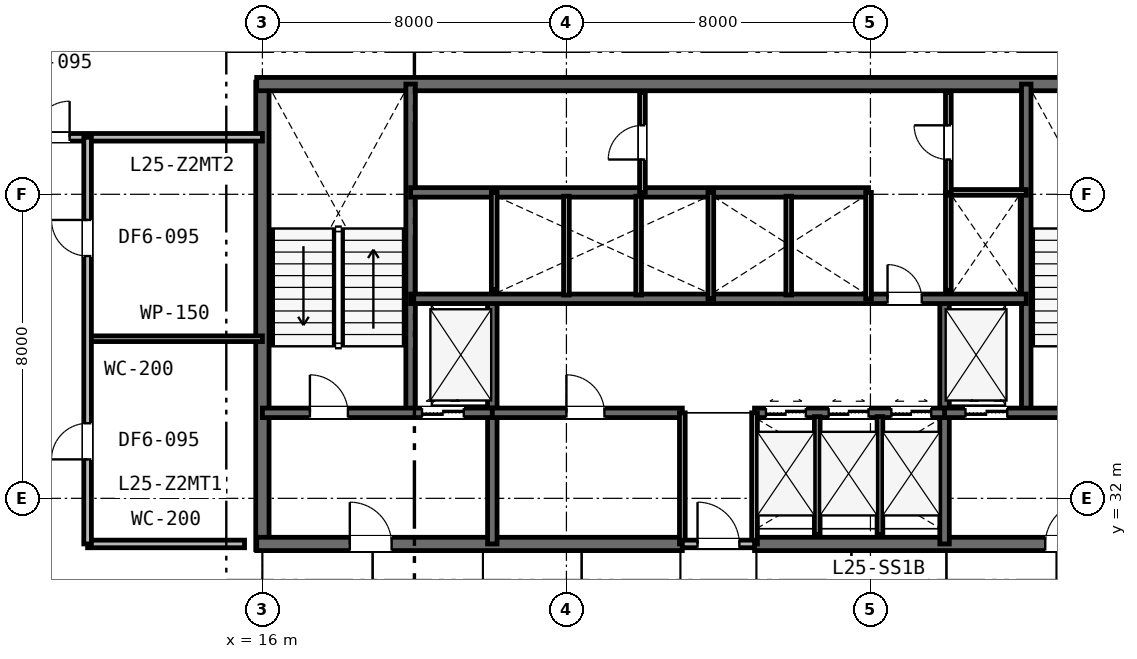
"""IFC4 building model, lengths in metres.
Left out: names, types, materials, properties, quantities, classifications, styles, units other than length and angle.
Written with IfcOpenShell. Run it as: python <this file> out.ifc"""

import sys

from ifc_helpers import new_model, si_unit, direction, frame, frame_2d, origin, place, context, subcontext, project, spatial, rectangle, extrude, element, fill, save


model = new_model("IFC4")
c1 = context("Model", 3, precision=1e-05, world=origin(), true_north=direction((0.0, 1.0)))
c2 = subcontext(c1, "Body", "Model", "MODEL_VIEW")
j1 = project(units=[si_unit("LENGTHUNIT", "METRE"), si_unit("PLANEANGLEUNIT", "RADIAN")], contexts=[c1])
p1 = place(None, origin())
s1 = spatial("IfcSite", under=j1, at=p1, CompositionType="ELEMENT")
p2 = place(p1, origin())
s2 = spatial("IfcBuilding", under=s1, at=p2, CompositionType="ELEMENT")
p3 = place(p2, frame((0.0, 0.0, 100.8)))
s3 = spatial("IfcBuildingStorey", under=s2, at=p3, CompositionType="ELEMENT", Elevation=100.8)
p4 = place(p3, frame((16.0, 30.65, 0.0), z_axis=(0.0, 0.0, 1.0), x_axis=(0.0, 1.0, 0.0)))
e1 = element("IfcWall", 1, at=p4, inside=s3, PredefinedType="SHEAR", context=c2, shape_type="SweptSolid", body=[
    extrude(rectangle(XDim=12.3, YDim=0.35, at=frame_2d((6.15, 0.0))), origin(), (0.0, 0.0, 1.0), 3.6),
])
p5 = place(p3, frame((15.85, 42.9, 0.0), z_axis=(0.0, 0.0, 1.0), x_axis=(1.0, 0.0, 0.0)))
e2 = element("IfcWall", 2, at=p5, inside=s3, PredefinedType="SHEAR", context=c2, shape_type="SweptSolid", body=[
    extrude(rectangle(XDim=24.3, YDim=0.35, at=frame_2d((12.15, 0.0))), origin(), (0.0, 0.0, 1.0), 3.6),
])
p6 = place(p3, frame((15.85, 30.8, 0.0), z_axis=(0.0, 0.0, 1.0), x_axis=(1.0, 0.0, 0.0)))
e3 = element("IfcWall", 3, at=p6, inside=s3, PredefinedType="SHEAR", context=c2, shape_type="SweptSolid", body=[
    extrude(rectangle(XDim=11.2, YDim=0.35, at=frame_2d((5.6, 0.0))), origin(), (0.0, 0.0, 1.0), 3.6),
])
p7 = place(p6, frame((2.45, 0.0, 0.0)))
e4 = element("IfcOpeningElement", 4, at=p7, cuts=e3, PredefinedType="OPENING", context=c2, shape_type="SweptSolid", body=[
    extrude(rectangle(XDim=1.1, YDim=2.15, at=frame_2d((0.55, 1.075))), frame((0.0, 0.185, 0.0), z_axis=(0.0, -1.0, 0.0), x_axis=(1.0, 0.0, 0.0)), (0.0, 0.0, 1.0), 0.37),
])
p8 = place(p3, frame((28.95, 30.8, 0.0), z_axis=(0.0, 0.0, 1.0), x_axis=(1.0, 0.0, 0.0)))
e5 = element("IfcWall", 5, at=p8, inside=s3, PredefinedType="SHEAR", context=c2, shape_type="SweptSolid", body=[
    extrude(rectangle(XDim=11.2, YDim=0.35, at=frame_2d((5.6, 0.0))), origin(), (0.0, 0.0, 1.0), 3.6),
])
p9 = place(p8, frame((7.65, 0.0, 0.0)))
e6 = element("IfcOpeningElement", 6, at=p9, cuts=e5, PredefinedType="OPENING", context=c2, shape_type="SweptSolid", body=[
    extrude(rectangle(XDim=1.1, YDim=2.15, at=frame_2d((0.55, 1.075))), frame((0.0, 0.185, 0.0), z_axis=(0.0, -1.0, 0.0), x_axis=(1.0, 0.0, 0.0)), (0.0, 0.0, 1.0), 0.37),
])
for number, where, z_axis, x_axis in (
    (7, (19.9, 34.25, 0.0), (0.0, 0.0, 1.0), (0.0, 1.0, 0.0)),
    (8, (36.1, 34.25, 0.0), (0.0, 0.0, 1.0), (0.0, 1.0, 0.0)),
):
    element("IfcWall", number, at=place(p3, frame(where, z_axis=z_axis, x_axis=x_axis)), inside=s3, PredefinedType="SHEAR", context=c2, shape_type="SweptSolid", body=[
        extrude(rectangle(XDim=8.65, YDim=0.25, at=frame_2d((4.325, 0.0))), origin(), (0.0, 0.0, 1.0), 3.6),
    ])
for number, where, z_axis, x_axis in (
    (9, (22.05, 30.8, 0.0), (0.0, 0.0, 1.0), (0.0, 1.0, 0.0)),
    (10, (33.95, 30.8, 0.0), (0.0, 0.0, 1.0), (0.0, 1.0, 0.0)),
):
    element("IfcWall", number, at=place(p3, frame(where, z_axis=z_axis, x_axis=x_axis)), inside=s3, PredefinedType="SHEAR", context=c2, shape_type="SweptSolid", body=[
        extrude(rectangle(XDim=6.45, YDim=0.25, at=frame_2d((3.225, 0.0))), origin(), (0.0, 0.0, 1.0), 3.6),
    ])
p10 = place(p3, frame((16.0, 34.25, 0.0), z_axis=(0.0, 0.0, 1.0), x_axis=(1.0, 0.0, 0.0)))
e11 = element("IfcWall", 11, at=p10, inside=s3, PredefinedType="SHEAR", context=c2, shape_type="SweptSolid", body=[
    extrude(rectangle(XDim=6.05, YDim=0.25, at=frame_2d((3.025, 0.0))), origin(), (0.0, 0.0, 1.0), 3.6),
])
p11 = place(p10, frame((1.25, 0.0, 0.0)))
e12 = element("IfcOpeningElement", 12, at=p11, cuts=e11, PredefinedType="OPENING", context=c2, shape_type="SweptSolid", body=[
    extrude(rectangle(XDim=1.0, YDim=2.15, at=frame_2d((0.5, 1.075))), frame((0.0, 0.135, 0.0), z_axis=(0.0, -1.0, 0.0), x_axis=(1.0, 0.0, 0.0)), (0.0, 0.0, 1.0), 0.27),
])
p12 = place(p10, frame((4.2, 0.0, 0.0)))
e13 = element("IfcOpeningElement", 13, at=p12, cuts=e11, PredefinedType="OPENING", context=c2, shape_type="SweptSolid", body=[
    extrude(rectangle(XDim=1.1, YDim=2.15, at=frame_2d((0.55, 1.075))), frame((0.0, 0.135, 0.0), z_axis=(0.0, -1.0, 0.0), x_axis=(1.0, 0.0, 0.0)), (0.0, 0.0, 1.0), 0.27),
])
p13 = place(p3, frame((33.95, 34.25, 0.0), z_axis=(0.0, 0.0, 1.0), x_axis=(1.0, 0.0, 0.0)))
e14 = element("IfcWall", 14, at=p13, inside=s3, PredefinedType="SHEAR", context=c2, shape_type="SweptSolid", body=[
    extrude(rectangle(XDim=6.05, YDim=0.25, at=frame_2d((3.025, 0.0))), origin(), (0.0, 0.0, 1.0), 3.6),
])
p14 = place(p13, frame((3.7, 0.0, 0.0)))
e15 = element("IfcOpeningElement", 15, at=p14, cuts=e14, PredefinedType="OPENING", context=c2, shape_type="SweptSolid", body=[
    extrude(rectangle(XDim=1.0, YDim=2.15, at=frame_2d((0.5, 1.075))), frame((0.0, 0.135, 0.0), z_axis=(0.0, -1.0, 0.0), x_axis=(1.0, 0.0, 0.0)), (0.0, 0.0, 1.0), 0.27),
])
p15 = place(p13, frame((0.55, 0.0, 0.0)))
e16 = element("IfcOpeningElement", 16, at=p15, cuts=e14, PredefinedType="OPENING", context=c2, shape_type="SweptSolid", body=[
    extrude(rectangle(XDim=1.1, YDim=2.15, at=frame_2d((0.55, 1.075))), frame((0.0, 0.135, 0.0), z_axis=(0.0, -1.0, 0.0), x_axis=(1.0, 0.0, 0.0)), (0.0, 0.0, 1.0), 0.27),
])
p16 = place(p3, frame((22.05, 34.25, 0.0), z_axis=(0.0, 0.0, 1.0), x_axis=(1.0, 0.0, 0.0)))
e17 = element("IfcWall", 17, at=p16, inside=s3, PredefinedType="SHEAR", context=c2, shape_type="SweptSolid", body=[
    extrude(rectangle(XDim=5.0, YDim=0.25, at=frame_2d((2.5, 0.0))), origin(), (0.0, 0.0, 1.0), 3.6),
])
p17 = place(p16, frame((1.95, 0.0, 0.0)))
e18 = element("IfcOpeningElement", 18, at=p17, cuts=e17, PredefinedType="OPENING", context=c2, shape_type="SweptSolid", body=[
    extrude(rectangle(XDim=1.0, YDim=2.15, at=frame_2d((0.5, 1.075))), frame((0.0, 0.135, 0.0), z_axis=(0.0, -1.0, 0.0), x_axis=(1.0, 0.0, 0.0)), (0.0, 0.0, 1.0), 0.27),
])
p18 = place(p3, frame((28.95, 34.25, 0.0), z_axis=(0.0, 0.0, 1.0), x_axis=(1.0, 0.0, 0.0)))
e19 = element("IfcWall", 19, at=p18, inside=s3, PredefinedType="SHEAR", context=c2, shape_type="SweptSolid", body=[
    extrude(rectangle(XDim=5.0, YDim=0.25, at=frame_2d((2.5, 0.0))), origin(), (0.0, 0.0, 1.0), 3.6),
])
p19 = place(p18, frame((0.3, 0.0, 0.0)))
e20 = element("IfcOpeningElement", 20, at=p19, cuts=e19, PredefinedType="OPENING", context=c2, shape_type="SweptSolid", body=[
    extrude(rectangle(XDim=1.05, YDim=2.15, at=frame_2d((0.525, 1.075))), frame((0.0, 0.135, 0.0), z_axis=(0.0, -1.0, 0.0), x_axis=(1.0, 0.0, 0.0)), (0.0, 0.0, 1.0), 0.27),
])
p20 = place(p18, frame((1.95, 0.0, 0.0)))
e21 = element("IfcOpeningElement", 21, at=p20, cuts=e19, PredefinedType="OPENING", context=c2, shape_type="SweptSolid", body=[
    extrude(rectangle(XDim=1.05, YDim=2.15, at=frame_2d((0.525, 1.075))), frame((0.0, 0.135, 0.0), z_axis=(0.0, -1.0, 0.0), x_axis=(1.0, 0.0, 0.0)), (0.0, 0.0, 1.0), 0.27),
])
p21 = place(p18, frame((3.6, 0.0, 0.0)))
e22 = element("IfcOpeningElement", 22, at=p21, cuts=e19, PredefinedType="OPENING", context=c2, shape_type="SweptSolid", body=[
    extrude(rectangle(XDim=1.05, YDim=2.15, at=frame_2d((0.525, 1.075))), frame((0.0, 0.135, 0.0), z_axis=(0.0, -1.0, 0.0), x_axis=(1.0, 0.0, 0.0)), (0.0, 0.0, 1.0), 0.27),
])
p22 = place(p3, frame((19.9, 37.25, 0.0), z_axis=(0.0, 0.0, 1.0), x_axis=(1.0, 0.0, 0.0)))
e23 = element("IfcWall", 23, at=p22, inside=s3, PredefinedType="SHEAR", context=c2, shape_type="SweptSolid", body=[
    extrude(rectangle(XDim=16.2, YDim=0.25, at=frame_2d((8.1, 0.0))), origin(), (0.0, 0.0, 1.0), 3.6),
])
p23 = place(p22, frame((12.55, 0.0, 0.0)))
e24 = element("IfcOpeningElement", 24, at=p23, cuts=e23, PredefinedType="OPENING", context=c2, shape_type="SweptSolid", body=[
    extrude(rectangle(XDim=0.9, YDim=2.15, at=frame_2d((0.45, 1.075))), frame((0.0, 0.135, 0.0), z_axis=(0.0, -1.0, 0.0), x_axis=(1.0, 0.0, 0.0)), (0.0, 0.0, 1.0), 0.27),
])
p24 = place(p3, frame((19.9, 40.05, 0.0), z_axis=(0.0, 0.0, 1.0), x_axis=(1.0, 0.0, 0.0)))
e25 = element("IfcWall", 25, at=p24, inside=s3, PredefinedType="SHEAR", context=c2, shape_type="SweptSolid", body=[
    extrude(rectangle(XDim=12.05, YDim=0.25, at=frame_2d((6.025, 0.0))), origin(), (0.0, 0.0, 1.0), 3.6),
])
p25 = place(p3, frame((27.05, 30.8, 0.0), z_axis=(0.0, 0.0, 1.0), x_axis=(0.0, 1.0, 0.0)))
e26 = element("IfcWall", 26, at=p25, inside=s3, PredefinedType="PLUMBINGWALL", context=c2, shape_type="SweptSolid", body=[
    extrude(rectangle(XDim=3.45, YDim=0.15, at=frame_2d((1.725, 0.0))), origin(), (0.0, 0.0, 1.0), 3.01),
])
p26 = place(p3, frame((28.95, 30.8, 0.0), z_axis=(0.0, 0.0, 1.0), x_axis=(0.0, 1.0, 0.0)))
e27 = element("IfcWall", 27, at=p26, inside=s3, PredefinedType="PLUMBINGWALL", context=c2, shape_type="SweptSolid", body=[
    extrude(rectangle(XDim=3.45, YDim=0.15, at=frame_2d((1.725, 0.0))), origin(), (0.0, 0.0, 1.0), 3.33),
])
p27 = place(p3, frame((27.05, 30.8, 0.0), z_axis=(0.0, 0.0, 1.0), x_axis=(1.0, 0.0, 0.0)))
e28 = element("IfcWall", 28, at=p27, inside=s3, PredefinedType="PARTITIONING", context=c2, shape_type="SweptSolid", body=[
    extrude(rectangle(XDim=1.9, YDim=0.2, at=frame_2d((0.95, 0.0))), origin(), (0.0, 0.0, 1.0), 3.01),
])
p28 = place(p27, frame((0.4, 0.0, 0.0)))
e29 = element("IfcOpeningElement", 29, at=p28, cuts=e28, PredefinedType="OPENING", context=c2, shape_type="SweptSolid", body=[
    extrude(rectangle(XDim=1.1, YDim=2.15, at=frame_2d((0.55, 1.075))), frame((0.0, 0.11, 0.0), z_axis=(0.0, -1.0, 0.0), x_axis=(1.0, 0.0, 0.0)), (0.0, 0.0, 1.0), 0.22),
])
for number, where, z_axis, x_axis in (
    (30, (30.6, 31.05, 0.0), (0.0, 0.0, 1.0), (0.0, 1.0, 0.0)),
    (31, (32.25, 31.05, 0.0), (0.0, 0.0, 1.0), (0.0, 1.0, 0.0)),
):
    element("IfcWall", number, at=place(p3, frame(where, z_axis=z_axis, x_axis=x_axis)), inside=s3, PredefinedType="PLUMBINGWALL", context=c2, shape_type="SweptSolid", body=[
        extrude(rectangle(XDim=3.1, YDim=0.15, at=frame_2d((1.55, 0.0))), origin(), (0.0, 0.0, 1.0), 3.33),
    ])
p29 = place(p3, frame((22.1, 37.49, 0.0), z_axis=(0.0, 0.0, 1.0), x_axis=(0.0, 1.0, 0.0)))
e32 = element("IfcWall", 32, at=p29, inside=s3, PredefinedType="PLUMBINGWALL", context=c2, shape_type="SweptSolid", body=[
    extrude(rectangle(XDim=2.56, YDim=0.15, at=frame_2d((1.28, 0.0))), origin(), (0.0, 0.0, 1.0), 3.33),
])
p30 = place(p3, frame((27.8, 37.25, 0.0), z_axis=(0.0, 0.0, 1.0), x_axis=(0.0, 1.0, 0.0)))
e33 = element("IfcWall", 33, at=p30, inside=s3, PredefinedType="PLUMBINGWALL", context=c2, shape_type="SweptSolid", body=[
    extrude(rectangle(XDim=2.8, YDim=0.15, at=frame_2d((1.4, 0.0))), origin(), (0.0, 0.0, 1.0), 3.33),
])
for number, where, z_axis, x_axis in (
    (34, (24.0, 37.35, 0.0), (0.0, 0.0, 1.0), (0.0, 1.0, 0.0)),
    (35, (25.9, 37.35, 0.0), (0.0, 0.0, 1.0), (0.0, 1.0, 0.0)),
):
    element("IfcWall", number, at=place(p3, frame(where, z_axis=z_axis, x_axis=x_axis)), inside=s3, PredefinedType="PLUMBINGWALL", context=c2, shape_type="SweptSolid", body=[
        extrude(rectangle(XDim=2.6, YDim=0.15, at=frame_2d((1.3, 0.0))), origin(), (0.0, 0.0, 1.0), 3.33),
    ])
p31 = place(p3, frame((31.95, 37.25, 0.0), z_axis=(0.0, 0.0, 1.0), x_axis=(0.0, 1.0, 0.0)))
e36 = element("IfcWall", 36, at=p31, inside=s3, PredefinedType="PLUMBINGWALL", context=c2, shape_type="SweptSolid", body=[
    extrude(rectangle(XDim=2.8, YDim=0.15, at=frame_2d((1.4, 0.0))), origin(), (0.0, 0.0, 1.0), 3.33),
])
p32 = place(p3, frame((29.85, 37.35, 0.0), z_axis=(0.0, 0.0, 1.0), x_axis=(0.0, 1.0, 0.0)))
e37 = element("IfcWall", 37, at=p32, inside=s3, PredefinedType="PLUMBINGWALL", context=c2, shape_type="SweptSolid", body=[
    extrude(rectangle(XDim=2.6, YDim=0.15, at=frame_2d((1.3, 0.0))), origin(), (0.0, 0.0, 1.0), 3.33),
])
p33 = place(p3, frame((34.05, 37.473, 0.0), z_axis=(0.0, 0.0, 1.0), x_axis=(0.0, 1.0, 0.0)))
e38 = element("IfcWall", 38, at=p33, inside=s3, PredefinedType="PLUMBINGWALL", context=c2, shape_type="SweptSolid", body=[
    extrude(rectangle(XDim=2.577, YDim=0.15, at=frame_2d((1.288, 0.0))), origin(), (0.0, 0.0, 1.0), 3.33),
])
p34 = place(p3, frame((34.05, 40.05, 0.0), z_axis=(0.0, 0.0, 1.0), x_axis=(1.0, 0.0, 0.0)))
e39 = element("IfcWall", 39, at=p34, inside=s3, PredefinedType="PARTITIONING", context=c2, shape_type="SweptSolid", body=[
    extrude(rectangle(XDim=2.05, YDim=0.15, at=frame_2d((1.025, 0.0))), origin(), (0.0, 0.0, 1.0), 3.33),
])
p35 = place(p3, frame((34.05, 40.05, 0.0), z_axis=(0.0, 0.0, 1.0), x_axis=(0.0, 1.0, 0.0)))
e40 = element("IfcWall", 40, at=p35, inside=s3, PredefinedType="PARTITIONING", context=c2, shape_type="SweptSolid", body=[
    extrude(rectangle(XDim=2.63, YDim=0.15, at=frame_2d((1.315, 0.0))), origin(), (0.0, 0.0, 1.0), 3.33),
])
p36 = place(p35, frame((0.865, 0.0, 0.0)))
e41 = element("IfcOpeningElement", 41, at=p36, cuts=e40, PredefinedType="OPENING", context=c2, shape_type="SweptSolid", body=[
    extrude(rectangle(XDim=0.9, YDim=2.15, at=frame_2d((0.45, 1.075))), frame((0.0, 0.085, 0.0), z_axis=(0.0, -1.0, 0.0), x_axis=(1.0, 0.0, 0.0)), (0.0, 0.0, 1.0), 0.17),
])
p37 = place(p3, frame((26.0, 40.05, 0.0), z_axis=(0.0, 0.0, 1.0), x_axis=(0.0, 1.0, 0.0)))
e42 = element("IfcWall", 42, at=p37, inside=s3, PredefinedType="PARTITIONING", context=c2, shape_type="SweptSolid", body=[
    extrude(rectangle(XDim=2.63, YDim=0.15, at=frame_2d((1.315, 0.0))), origin(), (0.0, 0.0, 1.0), 3.33),
])
p38 = place(p37, frame((0.865, 0.0, 0.0)))
e43 = element("IfcOpeningElement", 43, at=p38, cuts=e42, PredefinedType="OPENING", context=c2, shape_type="SweptSolid", body=[
    extrude(rectangle(XDim=0.9, YDim=2.15, at=frame_2d((0.45, 1.075))), frame((0.0, 0.085, 0.0), z_axis=(0.0, -1.0, 0.0), x_axis=(1.0, 0.0, 0.0)), (0.0, 0.0, 1.0), 0.17),
])
p39 = place(p3, frame((11.4, 30.8, 0.0), z_axis=(0.0, 0.0, 1.0), x_axis=(1.0, 0.0, 0.0)))
e44 = element("IfcWall", 44, at=p39, inside=s3, PredefinedType="PARTITIONING", context=c2, shape_type="SweptSolid", body=[
    extrude(rectangle(XDim=4.13, YDim=0.2, at=frame_2d((2.065, 0.0))), origin(), (0.0, 0.0, 1.0), 2.87),
])
p40 = place(p3, frame((0.1, 41.5, 0.0), z_axis=(0.0, 0.0, 1.0), x_axis=(1.0, 0.0, 0.0)))
e45 = element("IfcWall", 45, at=p40, inside=s3, PredefinedType="PARTITIONING", context=c2, shape_type="SweptSolid", body=[
    extrude(rectangle(XDim=15.9, YDim=0.2, at=frame_2d((7.95, 0.0))), origin(), (0.0, 0.0, 1.0), 2.87),
])
p41 = place(p40, frame((9.877, 0.0, 0.0)))
e46 = element("IfcOpeningElement", 46, at=p41, cuts=e45, PredefinedType="OPENING", context=c2, shape_type="SweptSolid", body=[
    extrude(rectangle(XDim=0.95, YDim=2.15, at=frame_2d((0.475, 1.075))), frame((0.0, 0.11, 0.0), z_axis=(0.0, -1.0, 0.0), x_axis=(1.0, 0.0, 0.0)), (0.0, 0.0, 1.0), 0.22),
])
p42 = place(p3, frame((11.4, 36.2, 0.0), z_axis=(0.0, 0.0, 1.0), x_axis=(1.0, 0.0, 0.0)))
e47 = element("IfcWall", 47, at=p42, inside=s3, PredefinedType="PARTITIONING", context=c2, shape_type="SweptSolid", body=[
    extrude(rectangle(XDim=4.6, YDim=0.15, at=frame_2d((2.3, 0.0))), origin(), (0.0, 0.0, 1.0), 3.33),
])
p43 = place(p3, frame((11.4, 30.8, 0.0), z_axis=(0.0, 0.0, 1.0), x_axis=(0.0, 1.0, 0.0)))
e48 = element("IfcWall", 48, at=p43, inside=s3, PredefinedType="PARTITIONING", context=c2, shape_type="SweptSolid", body=[
    extrude(rectangle(XDim=10.7, YDim=0.2, at=frame_2d((5.35, 0.0))), origin(), (0.0, 0.0, 1.0), 2.87),
])
p44 = place(p43, frame((2.225, 0.0, 0.0)))
e49 = element("IfcOpeningElement", 49, at=p44, cuts=e48, PredefinedType="OPENING", context=c2, shape_type="SweptSolid", body=[
    extrude(rectangle(XDim=0.95, YDim=2.15, at=frame_2d((0.475, 1.075))), frame((0.0, 0.11, 0.0), z_axis=(0.0, -1.0, 0.0), x_axis=(1.0, 0.0, 0.0)), (0.0, 0.0, 1.0), 0.22),
])
p45 = place(p43, frame((7.575, 0.0, 0.0)))
e50 = element("IfcOpeningElement", 50, at=p45, cuts=e48, PredefinedType="OPENING", context=c2, shape_type="SweptSolid", body=[
    extrude(rectangle(XDim=0.95, YDim=2.15, at=frame_2d((0.475, 1.075))), frame((0.0, 0.11, 0.0), z_axis=(0.0, -1.0, 0.0), x_axis=(1.0, 0.0, 0.0)), (0.0, 0.0, 1.0), 0.22),
])
p46 = place(p28, origin())
e51 = element("IfcDoor", 51, at=p46, inside=s3, OperationType="SINGLE_SWING_LEFT", PredefinedType="DOOR", context=c2, shape_type="SweptSolid", body=[
    extrude(rectangle(XDim=1.1, YDim=2.15, at=frame_2d((0.55, 1.075))), frame((0.0, 0.025, 0.0), z_axis=(0.0, -1.0, 0.0), x_axis=(1.0, 0.0, 0.0)), (0.0, 0.0, 1.0), 0.05),
])
fill(e29, e51)
p47 = place(p11, origin())
e52 = element("IfcDoor", 52, at=p47, inside=s3, OperationType="SINGLE_SWING_LEFT", PredefinedType="DOOR", context=c2, shape_type="SweptSolid", body=[
    extrude(rectangle(XDim=1.0, YDim=2.15, at=frame_2d((0.5, 1.075))), frame((0.0, 0.025, 0.0), z_axis=(0.0, -1.0, 0.0), x_axis=(1.0, 0.0, 0.0)), (0.0, 0.0, 1.0), 0.05),
])
fill(e12, e52)
p48 = place(p7, origin())
e53 = element("IfcDoor", 53, at=p48, inside=s3, OperationType="SINGLE_SWING_LEFT", PredefinedType="DOOR", context=c2, shape_type="SweptSolid", body=[
    extrude(rectangle(XDim=1.1, YDim=2.15, at=frame_2d((0.55, 1.075))), frame((0.0, 0.025, 0.0), z_axis=(0.0, -1.0, 0.0), x_axis=(1.0, 0.0, 0.0)), (0.0, 0.0, 1.0), 0.05),
])
fill(e4, e53)
p49 = place(p9, origin())
e54 = element("IfcDoor", 54, at=p49, inside=s3, OperationType="SINGLE_SWING_RIGHT", PredefinedType="DOOR", context=c2, shape_type="SweptSolid", body=[
    extrude(rectangle(XDim=1.1, YDim=2.15, at=frame_2d((0.55, 1.075))), frame((0.0, 0.025, 0.0), z_axis=(0.0, -1.0, 0.0), x_axis=(1.0, 0.0, 0.0)), (0.0, 0.0, 1.0), 0.05),
])
fill(e6, e54)
p50 = place(p17, origin())
e55 = element("IfcDoor", 55, at=p50, inside=s3, OperationType="SINGLE_SWING_LEFT", PredefinedType="DOOR", context=c2, shape_type="SweptSolid", body=[
    extrude(rectangle(XDim=1.0, YDim=2.15, at=frame_2d((0.5, 1.075))), frame((0.0, 0.025, 0.0), z_axis=(0.0, -1.0, 0.0), x_axis=(1.0, 0.0, 0.0)), (0.0, 0.0, 1.0), 0.05),
])
fill(e18, e55)
p51 = place(p23, origin())
e56 = element("IfcDoor", 56, at=p51, inside=s3, OperationType="SINGLE_SWING_LEFT", PredefinedType="DOOR", context=c2, shape_type="SweptSolid", body=[
    extrude(rectangle(XDim=0.9, YDim=2.15, at=frame_2d((0.45, 1.075))), frame((0.0, 0.025, 0.0), z_axis=(0.0, -1.0, 0.0), x_axis=(1.0, 0.0, 0.0)), (0.0, 0.0, 1.0), 0.05),
])
fill(e24, e56)
p52 = place(p36, origin())
e57 = element("IfcDoor", 57, at=p52, inside=s3, OperationType="SINGLE_SWING_RIGHT", PredefinedType="DOOR", context=c2, shape_type="SweptSolid", body=[
    extrude(rectangle(XDim=0.9, YDim=2.15, at=frame_2d((0.45, 1.075))), frame((0.0, 0.025, 0.0), z_axis=(0.0, -1.0, 0.0), x_axis=(1.0, 0.0, 0.0)), (0.0, 0.0, 1.0), 0.05),
])
fill(e41, e57)
p53 = place(p38, origin())
e58 = element("IfcDoor", 58, at=p53, inside=s3, OperationType="SINGLE_SWING_LEFT", PredefinedType="DOOR", context=c2, shape_type="SweptSolid", body=[
    extrude(rectangle(XDim=0.9, YDim=2.15, at=frame_2d((0.45, 1.075))), frame((0.0, 0.025, 0.0), z_axis=(0.0, -1.0, 0.0), x_axis=(1.0, 0.0, 0.0)), (0.0, 0.0, 1.0), 0.05),
])
fill(e43, e58)
p54 = place(p41, origin())
e59 = element("IfcDoor", 59, at=p54, inside=s3, OperationType="SINGLE_SWING_RIGHT", PredefinedType="DOOR", context=c2, shape_type="SweptSolid", body=[
    extrude(rectangle(XDim=0.95, YDim=2.15, at=frame_2d((0.475, 1.075))), frame((0.0, 0.025, 0.0), z_axis=(0.0, -1.0, 0.0), x_axis=(1.0, 0.0, 0.0)), (0.0, 0.0, 1.0), 0.05),
])
fill(e46, e59)
p55 = place(p44, origin())
e60 = element("IfcDoor", 60, at=p55, inside=s3, OperationType="SINGLE_SWING_LEFT", PredefinedType="DOOR", context=c2, shape_type="SweptSolid", body=[
    extrude(rectangle(XDim=0.95, YDim=2.15, at=frame_2d((0.475, 1.075))), frame((0.0, 0.025, 0.0), z_axis=(0.0, -1.0, 0.0), x_axis=(1.0, 0.0, 0.0)), (0.0, 0.0, 1.0), 0.05),
])
fill(e49, e60)
p56 = place(p45, origin())
e61 = element("IfcDoor", 61, at=p56, inside=s3, OperationType="SINGLE_SWING_RIGHT", PredefinedType="DOOR", context=c2, shape_type="SweptSolid", body=[
    extrude(rectangle(XDim=0.95, YDim=2.15, at=frame_2d((0.475, 1.075))), frame((0.0, 0.025, 0.0), z_axis=(0.0, -1.0, 0.0), x_axis=(1.0, 0.0, 0.0)), (0.0, 0.0, 1.0), 0.05),
])
fill(e50, e61)
p57 = place(p12, origin())
e62 = element("IfcDoor", 62, at=p57, inside=s3, OperationType="DOUBLE_DOOR_SLIDING", PredefinedType="DOOR", context=c2, shape_type="SweptSolid", body=[
    extrude(rectangle(XDim=1.1, YDim=2.15, at=frame_2d((0.55, 1.075))), frame((0.0, 0.025, 0.0), z_axis=(0.0, -1.0, 0.0), x_axis=(1.0, 0.0, 0.0)), (0.0, 0.0, 1.0), 0.05),
])
fill(e13, e62)
p58 = place(p15, origin())
e63 = element("IfcDoor", 63, at=p58, inside=s3, OperationType="DOUBLE_DOOR_SLIDING", PredefinedType="DOOR", context=c2, shape_type="SweptSolid", body=[
    extrude(rectangle(XDim=1.1, YDim=2.15, at=frame_2d((0.55, 1.075))), frame((0.0, 0.025, 0.0), z_axis=(0.0, -1.0, 0.0), x_axis=(1.0, 0.0, 0.0)), (0.0, 0.0, 1.0), 0.05),
])
fill(e16, e63)
p59 = place(p19, origin())
e64 = element("IfcDoor", 64, at=p59, inside=s3, OperationType="DOUBLE_DOOR_SLIDING", PredefinedType="DOOR", context=c2, shape_type="SweptSolid", body=[
    extrude(rectangle(XDim=1.05, YDim=2.15, at=frame_2d((0.525, 1.075))), frame((0.0, 0.025, 0.0), z_axis=(0.0, -1.0, 0.0), x_axis=(1.0, 0.0, 0.0)), (0.0, 0.0, 1.0), 0.05),
])
fill(e20, e64)
p60 = place(p20, origin())
e65 = element("IfcDoor", 65, at=p60, inside=s3, OperationType="DOUBLE_DOOR_SLIDING", PredefinedType="DOOR", context=c2, shape_type="SweptSolid", body=[
    extrude(rectangle(XDim=1.05, YDim=2.15, at=frame_2d((0.525, 1.075))), frame((0.0, 0.025, 0.0), z_axis=(0.0, -1.0, 0.0), x_axis=(1.0, 0.0, 0.0)), (0.0, 0.0, 1.0), 0.05),
])
fill(e21, e65)
p61 = place(p21, origin())
e66 = element("IfcDoor", 66, at=p61, inside=s3, OperationType="DOUBLE_DOOR_SLIDING", PredefinedType="DOOR", context=c2, shape_type="SweptSolid", body=[
    extrude(rectangle(XDim=1.05, YDim=2.15, at=frame_2d((0.525, 1.075))), frame((0.0, 0.025, 0.0), z_axis=(0.0, -1.0, 0.0), x_axis=(1.0, 0.0, 0.0)), (0.0, 0.0, 1.0), 0.05),
])
fill(e22, e66)
save(model, sys.argv[1])
